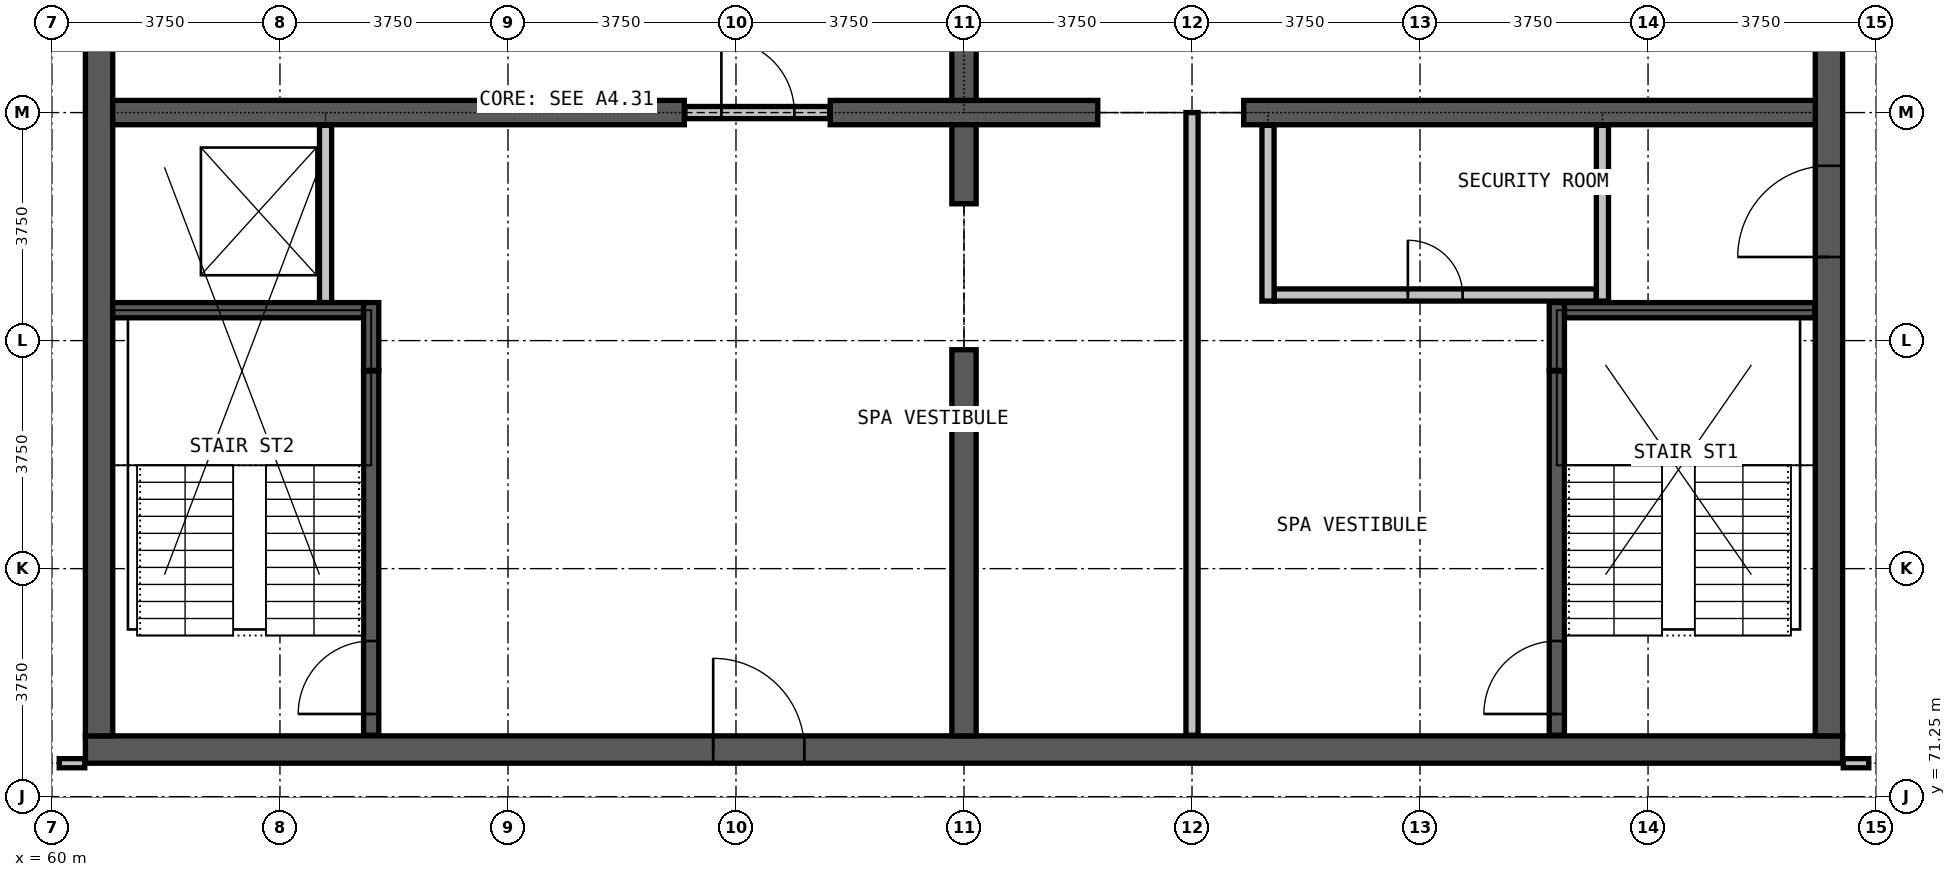
"""IFC4 building model, lengths in metres.
Left out: names, types, materials, properties, quantities, classifications, styles, units other than length and angle.
Written with IfcOpenShell. Run it as: python <this file> out.ifc"""

import sys

from ifc_helpers import new_model, si_unit, direction, frame, frame_2d, origin, place, context, subcontext, project, spatial, rectangle, extrude, element, fill, save


model = new_model("IFC4")
c1 = context("Model", 3, precision=1e-05, world=origin(), true_north=direction((0.0, 1.0)))
c2 = subcontext(c1, "Body", "Model", "MODEL_VIEW")
j1 = project(units=[si_unit("LENGTHUNIT", "METRE"), si_unit("PLANEANGLEUNIT", "RADIAN")], contexts=[c1])
p1 = place(None, origin())
s1 = spatial("IfcSite", under=j1, at=p1, CompositionType="ELEMENT")
p2 = place(p1, origin())
s2 = spatial("IfcBuilding", under=s1, at=p2, CompositionType="ELEMENT")
p3 = place(p2, frame((0.0, 0.0, 280.1)))
s3 = spatial("IfcBuildingStorey", under=s2, at=p3, CompositionType="ELEMENT", Elevation=280.1)
p4 = place(p3, frame((60.55, 72.025, 0.0), z_axis=(0.0, 0.0, 1.0), x_axis=(1.0, 0.0, 0.0)))
e1 = element("IfcWall", 1, at=p4, inside=s3, PredefinedType="SHEAR", context=c2, shape_type="SweptSolid", body=[
    extrude(rectangle(XDim=28.9, YDim=0.45, at=frame_2d((14.45, 0.0))), origin(), (0.0, 0.0, 1.0), 3.6),
])
p5 = place(p4, frame((10.325, 0.0, 0.0)))
e2 = element("IfcOpeningElement", 2, at=p5, cuts=e1, PredefinedType="OPENING", context=c2, shape_type="SweptSolid", body=[
    extrude(rectangle(XDim=1.5, YDim=2.2, at=frame_2d((0.75, 1.1))), frame((0.0, 0.235, 0.0), z_axis=(0.0, -1.0, 0.0), x_axis=(1.0, 0.0, 0.0)), (0.0, 0.0, 1.0), 0.47),
])
p6 = place(p3, frame((89.225, 72.25, 0.0), z_axis=(0.0, 0.0, 1.0), x_axis=(0.0, 1.0, 0.0)))
e3 = element("IfcWall", 3, at=p6, inside=s3, PredefinedType="SHEAR", context=c2, shape_type="SweptSolid", body=[
    extrude(rectangle(XDim=20.5, YDim=0.45, at=frame_2d((10.25, 0.0))), origin(), (0.0, 0.0, 1.0), 3.6),
])
p7 = place(p6, frame((7.875, 0.0, 0.0)))
e4 = element("IfcOpeningElement", 4, at=p7, cuts=e3, PredefinedType="OPENING", context=c2, shape_type="SweptSolid", body=[
    extrude(rectangle(XDim=1.5, YDim=2.2, at=frame_2d((0.75, 1.1))), frame((0.0, 0.235, 0.0), z_axis=(0.0, -1.0, 0.0), x_axis=(1.0, 0.0, 0.0)), (0.0, 0.0, 1.0), 0.47),
])
p8 = place(p3, frame((60.775, 92.75, 0.0), z_axis=(0.0, 0.0, 1.0), x_axis=(0.0, -1.0, 0.0)))
e5 = element("IfcWall", 5, at=p8, inside=s3, PredefinedType="SHEAR", context=c2, shape_type="SweptSolid", body=[
    extrude(rectangle(XDim=20.5, YDim=0.45, at=frame_2d((10.25, 0.0))), origin(), (0.0, 0.0, 1.0), 3.6),
])
p9 = place(p8, frame((8.025, 0.0, 0.0)))
e6 = element("IfcOpeningElement", 6, at=p9, cuts=e5, PredefinedType="OPENING", context=c2, shape_type="SweptSolid", body=[
    extrude(rectangle(XDim=1.2, YDim=2.2, at=frame_2d((0.6, 1.1))), frame((0.0, 0.235, 0.0), z_axis=(0.0, -1.0, 0.0), x_axis=(1.0, 0.0, 0.0)), (0.0, 0.0, 1.0), 0.47),
])
p10 = place(p3, frame((61.0, 82.5, 0.0), z_axis=(0.0, 0.0, 1.0), x_axis=(1.0, 0.0, 0.0)))
e7 = element("IfcWall", 7, at=p10, inside=s3, PredefinedType="SHEAR", context=c2, shape_type="SweptSolid", body=[
    extrude(rectangle(XDim=9.4, YDim=0.4, at=frame_2d((4.7, 0.0))), origin(), (0.0, 0.0, 1.0), 3.6),
])
p11 = place(p3, frame((72.8, 82.5, 0.0), z_axis=(0.0, 0.0, 1.0), x_axis=(1.0, 0.0, 0.0)))
e8 = element("IfcWall", 8, at=p11, inside=s3, PredefinedType="SHEAR", context=c2, shape_type="SweptSolid", body=[
    extrude(rectangle(XDim=4.4, YDim=0.4, at=frame_2d((2.2, 0.0))), origin(), (0.0, 0.0, 1.0), 3.6),
])
p12 = place(p3, frame((79.6, 82.5, 0.0), z_axis=(0.0, 0.0, 1.0), x_axis=(1.0, 0.0, 0.0)))
e9 = element("IfcWall", 9, at=p12, inside=s3, PredefinedType="SHEAR", context=c2, shape_type="SweptSolid", body=[
    extrude(rectangle(XDim=9.4, YDim=0.4, at=frame_2d((4.7, 0.0))), origin(), (0.0, 0.0, 1.0), 3.6),
])
p13 = place(p3, frame((75.0, 72.25, 0.0), z_axis=(0.0, 0.0, 1.0), x_axis=(0.0, 1.0, 0.0)))
e10 = element("IfcWall", 10, at=p13, inside=s3, PredefinedType="SHEAR", context=c2, shape_type="SweptSolid", body=[
    extrude(rectangle(XDim=6.35, YDim=0.4, at=frame_2d((3.175, 0.0))), origin(), (0.0, 0.0, 1.0), 3.6),
])
for number, where, z_axis, x_axis in (
    (11, (75.0, 81.0, 0.0), (0.0, 0.0, 1.0), (0.0, 1.0, 0.0)),
    (12, (75.0, 82.7, 0.0), (0.0, 0.0, 1.0), (0.0, 1.0, 0.0)),
):
    element("IfcWall", number, at=place(p3, frame(where, z_axis=z_axis, x_axis=x_axis)), inside=s3, PredefinedType="SHEAR", context=c2, shape_type="SweptSolid", body=[
        extrude(rectangle(XDim=1.3, YDim=0.4, at=frame_2d((0.65, 0.0))), origin(), (0.0, 0.0, 1.0), 3.6),
    ])
p14 = place(p3, frame((80.1, 79.5, 0.0), z_axis=(0.0, 0.0, 1.0), x_axis=(1.0, 0.0, 0.0)))
e13 = element("IfcWall", 13, at=p14, inside=s3, PredefinedType="PARTITIONING", context=c2, shape_type="SweptSolid", body=[
    extrude(rectangle(XDim=5.3, YDim=0.2, at=frame_2d((2.65, 0.0))), origin(), (0.0, 0.0, 1.0), 3.3),
])
p15 = place(p14, frame((2.2, 0.0, 0.0)))
e14 = element("IfcOpeningElement", 14, at=p15, cuts=e13, PredefinedType="OPENING", context=c2, shape_type="SweptSolid", body=[
    extrude(rectangle(XDim=0.9, YDim=2.2, at=frame_2d((0.45, 1.1))), frame((0.0, 0.11, 0.0), z_axis=(0.0, -1.0, 0.0), x_axis=(1.0, 0.0, 0.0)), (0.0, 0.0, 1.0), 0.22),
])
p16 = place(p3, frame((70.41, 82.5, 0.0), z_axis=(0.0, 0.0, 1.0), x_axis=(1.0, 0.0, 0.0)))
e15 = element("IfcWall", 15, at=p16, inside=s3, PredefinedType="PARTITIONING", context=c2, shape_type="SweptSolid", body=[
    extrude(rectangle(XDim=2.38, YDim=0.2, at=frame_2d((1.19, 0.0))), origin(), (0.0, 0.0, 1.0), 2.4),
])
p17 = place(p16, frame((0.6, 0.0, 0.0)))
e16 = element("IfcOpeningElement", 16, at=p17, cuts=e15, PredefinedType="OPENING", context=c2, shape_type="SweptSolid", body=[
    extrude(rectangle(XDim=1.2, YDim=2.2, at=frame_2d((0.6, 1.1))), frame((0.0, 0.11, 0.0), z_axis=(0.0, -1.0, 0.0), x_axis=(1.0, 0.0, 0.0)), (0.0, 0.0, 1.0), 0.22),
])
p18 = place(p3, frame((78.75, 72.26, 0.0), z_axis=(0.0, 0.0, 1.0), x_axis=(0.0, 1.0, 0.0)))
e17 = element("IfcWall", 17, at=p18, inside=s3, PredefinedType="PARTITIONING", context=c2, shape_type="SweptSolid", body=[
    extrude(rectangle(XDim=10.24, YDim=0.2, at=frame_2d((5.12, 0.0))), origin(), (0.0, 0.0, 1.0), 3.3),
])
for number, where, z_axis, x_axis in (
    (18, (80.0, 79.4, 0.0), (0.0, 0.0, 1.0), (0.0, 1.0, 0.0)),
    (19, (85.5, 79.4, 0.0), (0.0, 0.0, 1.0), (0.0, 1.0, 0.0)),
):
    element("IfcWall", number, at=place(p3, frame(where, z_axis=z_axis, x_axis=x_axis)), inside=s3, PredefinedType="PARTITIONING", context=c2, shape_type="SweptSolid", body=[
        extrude(rectangle(XDim=2.89, YDim=0.2, at=frame_2d((1.445, 0.0))), origin(), (0.0, 0.0, 1.0), 3.3),
    ])
for number, where, z_axis, x_axis in (
    (20, (60.12, 71.8, 0.0), (0.0, 0.0, 1.0), (1.0, 0.0, 0.0)),
    (21, (89.46, 71.8, 0.0), (0.0, 0.0, 1.0), (1.0, 0.0, 0.0)),
):
    element("IfcWall", number, at=place(p3, frame(where, z_axis=z_axis, x_axis=x_axis)), inside=s3, PredefinedType="PARTITIONING", context=c2, shape_type="SweptSolid", body=[
        extrude(rectangle(XDim=0.42, YDim=0.15, at=frame_2d((0.21, 0.0))), origin(), (0.0, 0.0, 1.0), 3.3),
    ])
p19 = place(p3, frame((64.5, 79.375, 0.0), z_axis=(0.0, 0.0, 1.0), x_axis=(0.0, 1.0, 0.0)))
e22 = element("IfcWall", 22, at=p19, inside=s3, PredefinedType="PARTITIONING", context=c2, shape_type="SweptSolid", body=[
    extrude(rectangle(XDim=2.915, YDim=0.2, at=frame_2d((1.458, 0.0))), origin(), (0.0, 0.0, 1.0), 3.3),
])
p20 = place(p3, frame((61.0, 79.25, 0.0), z_axis=(0.0, 0.0, 1.0), x_axis=(1.0, 0.0, 0.0)))
e23 = element("IfcWall", 23, at=p20, inside=s3, PredefinedType="PARTITIONING", context=c2, shape_type="SweptSolid", body=[
    extrude(rectangle(XDim=4.125, YDim=0.25, at=frame_2d((2.062, 0.0))), origin(), (0.0, 0.0, 1.0), 3.3),
])
p21 = place(p3, frame((84.875, 79.25, 0.0), z_axis=(0.0, 0.0, 1.0), x_axis=(1.0, 0.0, 0.0)))
e24 = element("IfcWall", 24, at=p21, inside=s3, PredefinedType="PARTITIONING", context=c2, shape_type="SweptSolid", body=[
    extrude(rectangle(XDim=4.115, YDim=0.25, at=frame_2d((2.058, 0.0))), origin(), (0.0, 0.0, 1.0), 3.3),
])
p22 = place(p3, frame((65.25, 72.26, 0.0), z_axis=(0.0, 0.0, 1.0), x_axis=(0.0, 1.0, 0.0)))
e25 = element("IfcWall", 25, at=p22, inside=s3, PredefinedType="PARTITIONING", context=c2, shape_type="SweptSolid", body=[
    extrude(rectangle(XDim=5.99, YDim=0.25, at=frame_2d((2.995, 0.0))), origin(), (0.0, 0.0, 1.0), 3.3),
])
p23 = place(p22, frame((0.35, 0.0, 0.0)))
e26 = element("IfcOpeningElement", 26, at=p23, cuts=e25, PredefinedType="OPENING", context=c2, shape_type="SweptSolid", body=[
    extrude(rectangle(XDim=1.2, YDim=2.2, at=frame_2d((0.6, 1.1))), frame((0.0, 0.135, 0.0), z_axis=(0.0, -1.0, 0.0), x_axis=(1.0, 0.0, 0.0)), (0.0, 0.0, 1.0), 0.27),
])
p24 = place(p3, frame((65.25, 78.26, 0.0), z_axis=(0.0, 0.0, 1.0), x_axis=(0.0, 1.0, 0.0)))
e27 = element("IfcWall", 27, at=p24, inside=s3, PredefinedType="PARTITIONING", context=c2, shape_type="SweptSolid", body=[
    extrude(rectangle(XDim=1.115, YDim=0.25, at=frame_2d((0.558, 0.0))), origin(), (0.0, 0.0, 1.0), 3.3),
])
p25 = place(p3, frame((84.75, 72.26, 0.0), z_axis=(0.0, 0.0, 1.0), x_axis=(0.0, 1.0, 0.0)))
e28 = element("IfcWall", 28, at=p25, inside=s3, PredefinedType="PARTITIONING", context=c2, shape_type="SweptSolid", body=[
    extrude(rectangle(XDim=5.99, YDim=0.25, at=frame_2d((2.995, 0.0))), origin(), (0.0, 0.0, 1.0), 3.3),
])
p26 = place(p25, frame((0.35, 0.0, 0.0)))
e29 = element("IfcOpeningElement", 29, at=p26, cuts=e28, PredefinedType="OPENING", context=c2, shape_type="SweptSolid", body=[
    extrude(rectangle(XDim=1.2, YDim=2.2, at=frame_2d((0.6, 1.1))), frame((0.0, 0.135, 0.0), z_axis=(0.0, -1.0, 0.0), x_axis=(1.0, 0.0, 0.0)), (0.0, 0.0, 1.0), 0.27),
])
p27 = place(p3, frame((84.75, 78.26, 0.0), z_axis=(0.0, 0.0, 1.0), x_axis=(0.0, 1.0, 0.0)))
e30 = element("IfcWall", 30, at=p27, inside=s3, PredefinedType="PARTITIONING", context=c2, shape_type="SweptSolid", body=[
    extrude(rectangle(XDim=1.115, YDim=0.25, at=frame_2d((0.558, 0.0))), origin(), (0.0, 0.0, 1.0), 3.3),
])
p28 = place(p17, origin())
e31 = element("IfcDoor", 31, at=p28, inside=s3, OperationType="SINGLE_SWING_LEFT", PredefinedType="DOOR", context=c2, shape_type="SweptSolid", body=[
    extrude(rectangle(XDim=1.2, YDim=2.2, at=frame_2d((0.6, 1.1))), frame((0.0, 0.025, 0.0), z_axis=(0.0, -1.0, 0.0), x_axis=(1.0, 0.0, 0.0)), (0.0, 0.0, 1.0), 0.05),
])
fill(e16, e31)
p29 = place(p23, origin())
e32 = element("IfcDoor", 32, at=p29, inside=s3, OperationType="SINGLE_SWING_LEFT", PredefinedType="DOOR", context=c2, shape_type="SweptSolid", body=[
    extrude(rectangle(XDim=1.2, YDim=2.2, at=frame_2d((0.6, 1.1))), frame((0.0, 0.025, 0.0), z_axis=(0.0, -1.0, 0.0), x_axis=(1.0, 0.0, 0.0)), (0.0, 0.0, 1.0), 0.05),
])
fill(e26, e32)
p30 = place(p26, origin())
e33 = element("IfcDoor", 33, at=p30, inside=s3, OperationType="SINGLE_SWING_LEFT", PredefinedType="DOOR", context=c2, shape_type="SweptSolid", body=[
    extrude(rectangle(XDim=1.2, YDim=2.2, at=frame_2d((0.6, 1.1))), frame((0.0, 0.025, 0.0), z_axis=(0.0, -1.0, 0.0), x_axis=(1.0, 0.0, 0.0)), (0.0, 0.0, 1.0), 0.05),
])
fill(e29, e33)
p31 = place(p5, origin())
e34 = element("IfcDoor", 34, at=p31, inside=s3, OperationType="DOUBLE_DOOR_SINGLE_SWING", PredefinedType="DOOR", context=c2, shape_type="SweptSolid", body=[
    extrude(rectangle(XDim=1.5, YDim=2.2, at=frame_2d((0.75, 1.1))), frame((0.0, 0.025, 0.0), z_axis=(0.0, -1.0, 0.0), x_axis=(1.0, 0.0, 0.0)), (0.0, 0.0, 1.0), 0.05),
])
fill(e2, e34)
p32 = place(p7, origin())
e35 = element("IfcDoor", 35, at=p32, inside=s3, OperationType="DOUBLE_DOOR_SINGLE_SWING", PredefinedType="DOOR", context=c2, shape_type="SweptSolid", body=[
    extrude(rectangle(XDim=1.5, YDim=2.2, at=frame_2d((0.75, 1.1))), frame((0.0, 0.025, 0.0), z_axis=(0.0, -1.0, 0.0), x_axis=(1.0, 0.0, 0.0)), (0.0, 0.0, 1.0), 0.05),
])
fill(e4, e35)
p33 = place(p15, origin())
e36 = element("IfcDoor", 36, at=p33, inside=s3, OperationType="SINGLE_SWING_LEFT", PredefinedType="DOOR", context=c2, shape_type="SweptSolid", body=[
    extrude(rectangle(XDim=0.9, YDim=2.2, at=frame_2d((0.45, 1.1))), frame((0.0, 0.025, 0.0), z_axis=(0.0, -1.0, 0.0), x_axis=(1.0, 0.0, 0.0)), (0.0, 0.0, 1.0), 0.05),
])
fill(e14, e36)
save(model, sys.argv[1])
